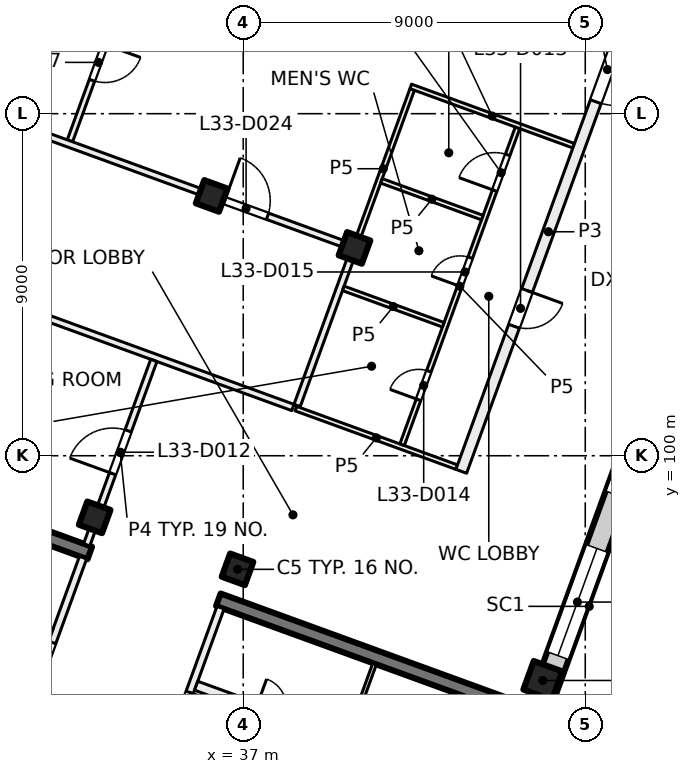
"""IFC4 building model, lengths in metres.
Left out: names, types, materials, properties, quantities, classifications, styles, units other than length and angle.
Written with IfcOpenShell. Run it as: python <this file> out.ifc"""

import sys

from ifc_helpers import new_model, si_unit, direction, frame, frame_2d, origin, origin_2d, place, context, subcontext, project, spatial, rectangle, extrude, element, fill, save


model = new_model("IFC4")
c1 = context("Model", 3, precision=1e-05, world=origin(), true_north=direction((0.0, 1.0)))
c2 = subcontext(c1, "Body", "Model", "MODEL_VIEW")
j1 = project(units=[si_unit("LENGTHUNIT", "METRE"), si_unit("PLANEANGLEUNIT", "RADIAN")], contexts=[c1])
p1 = place(None, origin())
s1 = spatial("IfcSite", under=j1, at=p1, CompositionType="ELEMENT")
p2 = place(p1, origin())
s2 = spatial("IfcBuilding", under=s1, at=p2, CompositionType="ELEMENT")
p3 = place(p2, frame((0.0, 0.0, 142.5)))
s3 = spatial("IfcBuildingStorey", under=s2, at=p3, CompositionType="ELEMENT", Elevation=142.5)
for number, where, z_axis, x_axis in (
    (1, (39.927, 105.468, 0.0), (0.0, 0.0, 1.0), (-0.342, -0.94, 0.0)),
    (2, (36.849, 97.011, 0.0), (0.0, 0.0, 1.0), (-0.342, -0.94, 0.0)),
    (3, (36.169, 106.836, 0.0), (0.0, 0.0, 1.0), (-0.342, -0.94, 0.0)),
    (4, (33.091, 98.379, 0.0), (0.0, 0.0, 1.0), (-0.342, -0.94, 0.0)),
):
    element("IfcColumn", number, at=place(p3, frame(where, z_axis=z_axis, x_axis=x_axis)), inside=s3, PredefinedType="COLUMN", context=c2, shape_type="SweptSolid", body=[
        extrude(rectangle(XDim=0.65, YDim=0.65, at=origin_2d()), origin(), (0.0, 0.0, 1.0), 4.0),
    ])
p4 = place(p3, frame((44.884, 94.087, 0.0), z_axis=(0.0, 0.0, 1.0), x_axis=(-0.342020143326, -0.939692620786, 0.0)))
e5 = element("IfcColumn", 5, at=p4, inside=s3, PredefinedType="COLUMN", context=c2, shape_type="SweptSolid", body=[
    extrude(rectangle(XDim=0.8, YDim=0.8, at=origin_2d()), origin(), (0.0, 0.0, 1.0), 4.0),
])
p5 = place(p3, frame((41.85, 85.241, 0.0), z_axis=(0.0, 0.0, 1.0), x_axis=(0.34201902012, 0.939693029598, 0.0)))
e6 = element("IfcWall", 6, at=p5, inside=s3, PredefinedType="SHEAR", context=c2, shape_type="SweptSolid", body=[
    extrude(rectangle(XDim=8.95, YDim=0.55, at=frame_2d((4.475, 0.0))), origin(), (0.0, 0.0, 1.0), 4.0),
])
p6 = place(p3, frame((44.473, 93.251, 0.0), z_axis=(0.0, 0.0, 1.0), x_axis=(-0.939692847377, 0.34201952077, 0.0)))
e7 = element("IfcWall", 7, at=p6, inside=s3, PredefinedType="SHEAR", context=c2, shape_type="SweptSolid", body=[
    extrude(rectangle(XDim=8.65, YDim=0.35, at=frame_2d((4.325, 0.0))), origin(), (0.0, 0.0, 1.0), 4.0),
])
p7 = place(p3, frame((32.962, 97.441, 0.0), z_axis=(0.0, 0.0, 1.0), x_axis=(-0.939689545667, 0.342028592028, 0.0)))
e8 = element("IfcWall", 8, at=p7, inside=s3, PredefinedType="SHEAR", context=c2, shape_type="SweptSolid", body=[
    extrude(rectangle(XDim=8.65, YDim=0.35, at=frame_2d((4.325, 0.0))), origin(), (0.0, 0.0, 1.0), 4.0),
])
p8 = place(p3, frame((52.212, 113.783, 0.0), z_axis=(0.0, 0.0, 1.0), x_axis=(-0.34202521188, -0.939690775968, 0.0)))
e9 = element("IfcWall", 9, at=p8, inside=s3, PredefinedType="SOLIDWALL", context=c2, shape_type="SweptSolid", body=[
    extrude(rectangle(XDim=21.745, YDim=0.6, at=frame_2d((10.873, 0.0))), origin(), (0.0, 0.0, 1.0), 3.625),
])
p9 = place(p8, frame((3.765, 0.0, 0.9)))
e10 = element("IfcOpeningElement", 10, at=p9, cuts=e9, PredefinedType="OPENING", context=c2, shape_type="SweptSolid", body=[
    extrude(rectangle(XDim=3.0, YDim=2.4, at=frame_2d((1.5, 1.2))), frame((0.0, 0.31, 0.0), z_axis=(0.0, -1.0, 0.0), x_axis=(1.0, 0.0, 0.0)), (0.0, 0.0, 1.0), 0.62),
])
p10 = place(p8, frame((8.865, 0.0, 0.0)))
e11 = element("IfcOpeningElement", 11, at=p10, cuts=e9, PredefinedType="OPENING", context=c2, shape_type="SweptSolid", body=[
    extrude(rectangle(XDim=1.8, YDim=2.4, at=frame_2d((0.9, 1.2))), frame((0.0, 0.31, 0.0), z_axis=(0.0, -1.0, 0.0), x_axis=(1.0, 0.0, 0.0)), (0.0, 0.0, 1.0), 0.62),
])
p11 = place(p8, frame((12.765, 0.0, 0.9)))
e12 = element("IfcOpeningElement", 12, at=p11, cuts=e9, PredefinedType="OPENING", context=c2, shape_type="SweptSolid", body=[
    extrude(rectangle(XDim=3.0, YDim=2.4, at=frame_2d((1.5, 1.2))), frame((0.0, 0.31, 0.0), z_axis=(0.0, -1.0, 0.0), x_axis=(1.0, 0.0, 0.0)), (0.0, 0.0, 1.0), 0.62),
])
p12 = place(p8, frame((17.265, 0.0, 0.9)))
e13 = element("IfcOpeningElement", 13, at=p12, cuts=e9, PredefinedType="OPENING", context=c2, shape_type="SweptSolid", body=[
    extrude(rectangle(XDim=3.0, YDim=2.4, at=frame_2d((1.5, 1.2))), frame((0.0, 0.31, 0.0), z_axis=(0.0, -1.0, 0.0), x_axis=(1.0, 0.0, 0.0)), (0.0, 0.0, 1.0), 0.62),
])
p13 = place(p3, frame((24.666, 100.669, 0.0), z_axis=(0.0, 0.0, 1.0), x_axis=(0.34201964167, 0.939692803373, 0.0)))
e14 = element("IfcWall", 14, at=p13, inside=s3, PredefinedType="SOLIDWALL", context=c2, shape_type="SweptSolid", body=[
    extrude(rectangle(XDim=32.884, YDim=0.6, at=frame_2d((16.442, 0.0))), origin(), (0.0, 0.0, 1.0), 3.625),
])
p14 = place(p13, frame((1.48, 0.0, 0.9)))
e15 = element("IfcOpeningElement", 15, at=p14, cuts=e14, PredefinedType="OPENING", context=c2, shape_type="SweptSolid", body=[
    extrude(rectangle(XDim=3.0, YDim=2.4, at=frame_2d((1.5, 1.2))), frame((0.0, 0.31, 0.0), z_axis=(0.0, -1.0, 0.0), x_axis=(1.0, 0.0, 0.0)), (0.0, 0.0, 1.0), 0.62),
])
p15 = place(p13, frame((5.98, 0.0, 0.9)))
e16 = element("IfcOpeningElement", 16, at=p15, cuts=e14, PredefinedType="OPENING", context=c2, shape_type="SweptSolid", body=[
    extrude(rectangle(XDim=3.0, YDim=2.4, at=frame_2d((1.5, 1.2))), frame((0.0, 0.31, 0.0), z_axis=(0.0, -1.0, 0.0), x_axis=(1.0, 0.0, 0.0)), (0.0, 0.0, 1.0), 0.62),
])
p16 = place(p13, frame((11.08, 0.0, 0.0)))
e17 = element("IfcOpeningElement", 17, at=p16, cuts=e14, PredefinedType="OPENING", context=c2, shape_type="SweptSolid", body=[
    extrude(rectangle(XDim=1.8, YDim=2.4, at=frame_2d((0.9, 1.2))), frame((0.0, 0.31, 0.0), z_axis=(0.0, -1.0, 0.0), x_axis=(1.0, 0.0, 0.0)), (0.0, 0.0, 1.0), 0.62),
])
p17 = place(p13, frame((14.98, 0.0, 0.9)))
e18 = element("IfcOpeningElement", 18, at=p17, cuts=e14, PredefinedType="OPENING", context=c2, shape_type="SweptSolid", body=[
    extrude(rectangle(XDim=3.0, YDim=2.4, at=frame_2d((1.5, 1.2))), frame((0.0, 0.31, 0.0), z_axis=(0.0, -1.0, 0.0), x_axis=(1.0, 0.0, 0.0)), (0.0, 0.0, 1.0), 0.62),
])
p18 = place(p13, frame((19.48, 0.0, 0.9)))
e19 = element("IfcOpeningElement", 19, at=p18, cuts=e14, PredefinedType="OPENING", context=c2, shape_type="SweptSolid", body=[
    extrude(rectangle(XDim=3.0, YDim=2.4, at=frame_2d((1.5, 1.2))), frame((0.0, 0.31, 0.0), z_axis=(0.0, -1.0, 0.0), x_axis=(1.0, 0.0, 0.0)), (0.0, 0.0, 1.0), 0.62),
])
p19 = place(p13, frame((24.58, 0.0, 0.0)))
e20 = element("IfcOpeningElement", 20, at=p19, cuts=e14, PredefinedType="OPENING", context=c2, shape_type="SweptSolid", body=[
    extrude(rectangle(XDim=1.8, YDim=2.4, at=frame_2d((0.9, 1.2))), frame((0.0, 0.31, 0.0), z_axis=(0.0, -1.0, 0.0), x_axis=(1.0, 0.0, 0.0)), (0.0, 0.0, 1.0), 0.62),
])
p20 = place(p13, frame((28.48, 0.0, 0.9)))
e21 = element("IfcOpeningElement", 21, at=p20, cuts=e14, PredefinedType="OPENING", context=c2, shape_type="SweptSolid", body=[
    extrude(rectangle(XDim=3.0, YDim=2.4, at=frame_2d((1.5, 1.2))), frame((0.0, 0.31, 0.0), z_axis=(0.0, -1.0, 0.0), x_axis=(1.0, 0.0, 0.0)), (0.0, 0.0, 1.0), 0.62),
])
p21 = place(p3, frame((31.459, 93.678, 0.0), z_axis=(0.0, 0.0, 1.0), x_axis=(0.341985870128, 0.939705094502, 0.0)))
e22 = element("IfcWall", 22, at=p21, inside=s3, PredefinedType="PARTITIONING", context=c2, shape_type="SweptSolid", body=[
    extrude(rectangle(XDim=3.875, YDim=0.2, at=frame_2d((1.938, 0.0))), origin(), (0.0, 0.0, 1.0), 3.625),
])
p22 = place(p21, frame((0.3, 0.0, 0.0)))
e23 = element("IfcOpeningElement", 23, at=p22, cuts=e22, PredefinedType="OPENING", context=c2, shape_type="SweptSolid", body=[
    extrude(rectangle(XDim=1.2, YDim=2.1, at=frame_2d((0.6, 1.05))), frame((0.0, 0.11, 0.0), z_axis=(0.0, -1.0, 0.0), x_axis=(1.0, 0.0, 0.0)), (0.0, 0.0, 1.0), 0.22),
])
p23 = place(p3, frame((24.039, 98.215, 0.0), z_axis=(0.0, 0.0, 1.0), x_axis=(0.939687617333, -0.342033889887, 0.0)))
e24 = element("IfcWall", 24, at=p23, inside=s3, PredefinedType="PARTITIONING", context=c2, shape_type="SweptSolid", body=[
    extrude(rectangle(XDim=8.425, YDim=0.25, at=frame_2d((4.212, 0.0))), origin(), (0.0, 0.0, 1.0), 3.625),
])
p24 = place(p23, frame((5.242, 0.0, 0.0)))
e25 = element("IfcOpeningElement", 25, at=p24, cuts=e24, PredefinedType="OPENING", context=c2, shape_type="SweptSolid", body=[
    extrude(rectangle(XDim=0.8, YDim=2.1, at=frame_2d((0.4, 1.05))), frame((0.0, 0.135, 0.0), z_axis=(0.0, -1.0, 0.0), x_axis=(1.0, 0.0, 0.0)), (0.0, 0.0, 1.0), 0.27),
])
p25 = place(p23, frame((0.88, 0.0, 0.0)))
e26 = element("IfcOpeningElement", 26, at=p25, cuts=e24, PredefinedType="OPENING", context=c2, shape_type="SweptSolid", body=[
    extrude(rectangle(XDim=1.0, YDim=2.1, at=frame_2d((0.5, 1.05))), frame((0.0, 0.135, 0.0), z_axis=(0.0, -1.0, 0.0), x_axis=(1.0, 0.0, 0.0)), (0.0, 0.0, 1.0), 0.27),
])
p26 = place(p3, frame((36.403, 96.003, 0.0), z_axis=(0.0, 0.0, 1.0), x_axis=(-0.342041503764, -0.939684845947, 0.0)))
e27 = element("IfcWall", 27, at=p26, inside=s3, PredefinedType="PARTITIONING", context=c2, shape_type="SweptSolid", body=[
    extrude(rectangle(XDim=3.875, YDim=0.2, at=frame_2d((1.938, 0.0))), origin(), (0.0, 0.0, 1.0), 3.625),
])
p27 = place(p26, frame((2.375, 0.0, 0.0)))
e28 = element("IfcOpeningElement", 28, at=p27, cuts=e27, PredefinedType="OPENING", context=c2, shape_type="SweptSolid", body=[
    extrude(rectangle(XDim=1.2, YDim=2.1, at=frame_2d((0.6, 1.05))), frame((0.0, 0.11, 0.0), z_axis=(0.0, -1.0, 0.0), x_axis=(1.0, 0.0, 0.0)), (0.0, 0.0, 1.0), 0.22),
])
p28 = place(p3, frame((35.761, 93.948, 0.0), z_axis=(0.0, 0.0, 1.0), x_axis=(0.93969693093, -0.342008301071, 0.0)))
e29 = element("IfcWall", 29, at=p28, inside=s3, PredefinedType="PARTITIONING", context=c2, shape_type="SweptSolid", body=[
    extrude(rectangle(XDim=8.425, YDim=0.25, at=frame_2d((4.212, 0.0))), origin(), (0.0, 0.0, 1.0), 3.625),
])
p29 = place(p28, frame((1.683, 0.0, 0.0)))
e30 = element("IfcOpeningElement", 30, at=p29, cuts=e29, PredefinedType="OPENING", context=c2, shape_type="SweptSolid", body=[
    extrude(rectangle(XDim=0.8, YDim=2.1, at=frame_2d((0.4, 1.05))), frame((0.0, 0.135, 0.0), z_axis=(0.0, -1.0, 0.0), x_axis=(1.0, 0.0, 0.0)), (0.0, 0.0, 1.0), 0.27),
])
p30 = place(p28, frame((5.945, 0.0, 0.0)))
e31 = element("IfcOpeningElement", 31, at=p30, cuts=e29, PredefinedType="OPENING", context=c2, shape_type="SweptSolid", body=[
    extrude(rectangle(XDim=0.8, YDim=2.1, at=frame_2d((0.4, 1.05))), frame((0.0, 0.135, 0.0), z_axis=(0.0, -1.0, 0.0), x_axis=(1.0, 0.0, 0.0)), (0.0, 0.0, 1.0), 0.27),
])
p31 = place(p3, frame((40.457, 94.527, 0.0), z_axis=(0.0, 0.0, 1.0), x_axis=(-0.342043138314, -0.939684250976, 0.0)))
e32 = element("IfcWall", 32, at=p31, inside=s3, PredefinedType="PARTITIONING", context=c2, shape_type="SweptSolid", body=[
    extrude(rectangle(XDim=2.025, YDim=0.1, at=frame_2d((1.012, 0.0))), origin(), (0.0, 0.0, 1.0), 3.625),
])
p32 = place(p3, frame((26.736, 105.48, 0.0), z_axis=(0.0, 0.0, 1.0), x_axis=(0.939721611154, -0.341940482438, 0.0)))
e33 = element("IfcWall", 33, at=p32, inside=s3, PredefinedType="PARTITIONING", context=c2, shape_type="SweptSolid", body=[
    extrude(rectangle(XDim=12.312, YDim=0.175, at=frame_2d((6.156, 0.0))), origin(), (0.0, 0.0, 1.0), 3.625),
])
p33 = place(p3, frame((37.053, 120.96, 0.0), z_axis=(0.0, 0.0, 1.0), x_axis=(-0.342023551531, -0.939691380293, 0.0)))
e34 = element("IfcWall", 34, at=p33, inside=s3, PredefinedType="PARTITIONING", context=c2, shape_type="SweptSolid", body=[
    extrude(rectangle(XDim=13.488, YDim=0.15, at=frame_2d((6.744, 0.0))), origin(), (0.0, 0.0, 1.0), 3.625),
])
p34 = place(p33, frame((10.791, 0.0, 0.0)))
e35 = element("IfcOpeningElement", 35, at=p34, cuts=e34, PredefinedType="OPENING", context=c2, shape_type="SweptSolid", body=[
    extrude(rectangle(XDim=1.0, YDim=2.1, at=frame_2d((0.5, 1.05))), frame((0.0, 0.085, 0.0), z_axis=(0.0, -1.0, 0.0), x_axis=(1.0, 0.0, 0.0)), (0.0, 0.0, 1.0), 0.17),
])
p35 = place(p33, frame((6.324, 0.0, 0.0)))
e36 = element("IfcOpeningElement", 36, at=p35, cuts=e34, PredefinedType="OPENING", context=c2, shape_type="SweptSolid", body=[
    extrude(rectangle(XDim=1.0, YDim=2.1, at=frame_2d((0.5, 1.05))), frame((0.0, 0.085, 0.0), z_axis=(0.0, -1.0, 0.0), x_axis=(1.0, 0.0, 0.0)), (0.0, 0.0, 1.0), 0.17),
])
p36 = place(p33, frame((1.824, 0.0, 0.0)))
e37 = element("IfcOpeningElement", 37, at=p36, cuts=e34, PredefinedType="OPENING", context=c2, shape_type="SweptSolid", body=[
    extrude(rectangle(XDim=1.0, YDim=2.1, at=frame_2d((0.5, 1.05))), frame((0.0, 0.085, 0.0), z_axis=(0.0, -1.0, 0.0), x_axis=(1.0, 0.0, 0.0)), (0.0, 0.0, 1.0), 0.17),
])
p37 = place(p3, frame((32.881, 97.657, 0.0), z_axis=(0.0, 0.0, 1.0), x_axis=(0.342058204353, 0.939678766832, 0.0)))
e38 = element("IfcWall", 38, at=p37, inside=s3, PredefinedType="PARTITIONING", context=c2, shape_type="SweptSolid", body=[
    extrude(rectangle(XDim=5.163, YDim=0.175, at=frame_2d((2.581, 0.0))), origin(), (0.0, 0.0, 1.0), 3.625),
])
p38 = place(p37, frame((1.991, 0.0, 0.0)))
e39 = element("IfcOpeningElement", 39, at=p38, cuts=e38, PredefinedType="OPENING", context=c2, shape_type="SweptSolid", body=[
    extrude(rectangle(XDim=1.2, YDim=2.1, at=frame_2d((0.6, 1.05))), frame((0.0, 0.097, 0.0), z_axis=(0.0, -1.0, 0.0), x_axis=(1.0, 0.0, 0.0)), (0.0, 0.0, 1.0), 0.195),
])
p39 = place(p3, frame((38.385, 101.24, 0.0), z_axis=(0.0, 0.0, 1.0), x_axis=(0.939711088937, -0.341969398235, 0.0)))
e40 = element("IfcWall", 40, at=p39, inside=s3, PredefinedType="PARTITIONING", context=c2, shape_type="SweptSolid", body=[
    extrude(rectangle(XDim=4.503, YDim=0.125, at=frame_2d((2.252, 0.0))), origin(), (0.0, 0.0, 1.0), 3.625),
])
p40 = place(p3, frame((38.418, 101.322, 0.0), z_axis=(0.0, 0.0, 1.0), x_axis=(0.341987815327, 0.939704386585, 0.0)))
e41 = element("IfcWall", 41, at=p40, inside=s3, PredefinedType="PARTITIONING", context=c2, shape_type="SweptSolid", body=[
    extrude(rectangle(XDim=4.325, YDim=0.175, at=frame_2d((2.162, 0.0))), origin(), (0.0, 0.0, 1.0), 3.625),
])
p41 = place(p3, frame((39.926, 105.465, 0.0), z_axis=(0.0, 0.0, 1.0), x_axis=(0.342263852659, 0.93960388205, 0.0)))
e42 = element("IfcWall", 42, at=p41, inside=s3, PredefinedType="PARTITIONING", context=c2, shape_type="SweptSolid", body=[
    extrude(rectangle(XDim=4.441, YDim=0.125, at=frame_2d((2.221, 0.0))), origin(), (0.0, 0.0, 1.0), 3.625),
])
p42 = place(p3, frame((28.275, 109.709, 0.0), z_axis=(0.0, 0.0, 1.0), x_axis=(0.939698441386, -0.342004150936, 0.0)))
e43 = element("IfcWall", 43, at=p42, inside=s3, PredefinedType="PARTITIONING", context=c2, shape_type="SweptSolid", body=[
    extrude(rectangle(XDim=12.312, YDim=0.175, at=frame_2d((6.156, 0.0))), origin(), (0.0, 0.0, 1.0), 3.625),
])
p43 = place(p42, frame((8.765, 0.0, 0.0)))
e44 = element("IfcOpeningElement", 44, at=p43, cuts=e43, PredefinedType="OPENING", context=c2, shape_type="SweptSolid", body=[
    extrude(rectangle(XDim=1.2, YDim=2.1, at=frame_2d((0.6, 1.05))), frame((0.0, 0.097, 0.0), z_axis=(0.0, -1.0, 0.0), x_axis=(1.0, 0.0, 0.0)), (0.0, 0.0, 1.0), 0.195),
])
p44 = place(p3, frame((41.181, 100.29, 0.0), z_axis=(0.0, 0.0, 1.0), x_axis=(0.34222012082, 0.939619810831, 0.0)))
e45 = element("IfcWall", 45, at=p44, inside=s3, PredefinedType="PARTITIONING", context=c2, shape_type="SweptSolid", body=[
    extrude(rectangle(XDim=8.875, YDim=0.125, at=frame_2d((4.438, 0.0))), origin(), (0.0, 0.0, 1.0), 3.625),
])
p45 = place(p44, frame((1.258, 0.0, 0.0)))
e46 = element("IfcOpeningElement", 46, at=p45, cuts=e45, PredefinedType="OPENING", context=c2, shape_type="SweptSolid", body=[
    extrude(rectangle(XDim=0.8, YDim=2.1, at=frame_2d((0.4, 1.05))), frame((0.0, 0.073, 0.0), z_axis=(0.0, -1.0, 0.0), x_axis=(1.0, 0.0, 0.0)), (0.0, 0.0, 1.0), 0.145),
])
p46 = place(p44, frame((4.437, 0.0, 0.0)))
e47 = element("IfcOpeningElement", 47, at=p46, cuts=e45, PredefinedType="OPENING", context=c2, shape_type="SweptSolid", body=[
    extrude(rectangle(XDim=0.8, YDim=2.1, at=frame_2d((0.4, 1.05))), frame((0.0, 0.073, 0.0), z_axis=(0.0, -1.0, 0.0), x_axis=(1.0, 0.0, 0.0)), (0.0, 0.0, 1.0), 0.145),
])
p47 = place(p44, frame((7.116, 0.0, 0.0)))
e48 = element("IfcOpeningElement", 48, at=p47, cuts=e45, PredefinedType="OPENING", context=c2, shape_type="SweptSolid", body=[
    extrude(rectangle(XDim=1.0, YDim=2.1, at=frame_2d((0.5, 1.05))), frame((0.0, 0.073, 0.0), z_axis=(0.0, -1.0, 0.0), x_axis=(1.0, 0.0, 0.0)), (0.0, 0.0, 1.0), 0.145),
])
p48 = place(p3, frame((41.408, 109.718, 0.0), z_axis=(0.0, 0.0, 1.0), x_axis=(0.939646475447, -0.3421469, 0.0)))
e49 = element("IfcWall", 49, at=p48, inside=s3, PredefinedType="PARTITIONING", context=c2, shape_type="SweptSolid", body=[
    extrude(rectangle(XDim=4.562, YDim=0.125, at=frame_2d((2.281, 0.0))), origin(), (0.0, 0.0, 1.0), 3.625),
])
p49 = place(p3, frame((42.264, 103.446, 0.0), z_axis=(0.0, 0.0, 1.0), x_axis=(-0.939640574808, 0.342163104635, 0.0)))
e50 = element("IfcWall", 50, at=p49, inside=s3, PredefinedType="PARTITIONING", context=c2, shape_type="SweptSolid", body=[
    extrude(rectangle(XDim=2.8, YDim=0.125, at=frame_2d((1.4, 0.0))), origin(), (0.0, 0.0, 1.0), 3.625),
])
p50 = place(p3, frame((47.325, 112.197, 0.0), z_axis=(0.0, 0.0, 1.0), x_axis=(-0.341976837053, -0.93970838185, 0.0)))
e51 = element("IfcWall", 51, at=p50, inside=s3, PredefinedType="PARTITIONING", context=c2, shape_type="SweptSolid", body=[
    extrude(rectangle(XDim=13.416, YDim=0.3, at=frame_2d((6.708, 0.0))), origin(), (0.0, 0.0, 1.0), 3.625),
])
p51 = place(p50, frame((8.354, 0.0, 0.0)))
e52 = element("IfcOpeningElement", 52, at=p51, cuts=e51, PredefinedType="OPENING", context=c2, shape_type="SweptSolid", body=[
    extrude(rectangle(XDim=1.0, YDim=2.1, at=frame_2d((0.5, 1.05))), frame((0.0, 0.16, 0.0), z_axis=(0.0, -1.0, 0.0), x_axis=(1.0, 0.0, 0.0)), (0.0, 0.0, 1.0), 0.32),
])
p52 = place(p50, frame((1.267, 0.0, 0.0)))
e53 = element("IfcOpeningElement", 53, at=p52, cuts=e51, PredefinedType="OPENING", context=c2, shape_type="SweptSolid", body=[
    extrude(rectangle(XDim=1.8, YDim=2.1, at=frame_2d((0.9, 1.05))), frame((0.0, 0.16, 0.0), z_axis=(0.0, -1.0, 0.0), x_axis=(1.0, 0.0, 0.0)), (0.0, 0.0, 1.0), 0.32),
])
p53 = place(p3, frame((43.29, 106.266, 0.0), z_axis=(0.0, 0.0, 1.0), x_axis=(-0.939601484935, 0.342270433294, 0.0)))
e54 = element("IfcWall", 54, at=p53, inside=s3, PredefinedType="PARTITIONING", context=c2, shape_type="SweptSolid", body=[
    extrude(rectangle(XDim=2.825, YDim=0.125, at=frame_2d((1.412, 0.0))), origin(), (0.0, 0.0, 1.0), 3.625),
])
p54 = place(p12, origin())
e55 = element("IfcWindow", 55, at=p54, inside=s3, PartitioningType="SINGLE_PANEL", PredefinedType="WINDOW", context=c2, shape_type="SweptSolid", body=[
    extrude(rectangle(XDim=3.0, YDim=2.4, at=frame_2d((1.5, 1.2))), frame((0.0, 0.03, 0.0), z_axis=(0.0, -1.0, 0.0), x_axis=(1.0, 0.0, 0.0)), (0.0, 0.0, 1.0), 0.06),
])
fill(e13, e55)
p55 = place(p22, origin())
e56 = element("IfcDoor", 56, at=p55, inside=s3, OperationType="DOUBLE_DOOR_SINGLE_SWING", PredefinedType="DOOR", context=c2, shape_type="SweptSolid", body=[
    extrude(rectangle(XDim=1.2, YDim=2.1, at=frame_2d((0.6, 1.05))), frame((0.0, 0.025, 0.0), z_axis=(0.0, -1.0, 0.0), x_axis=(1.0, 0.0, 0.0)), (0.0, 0.0, 1.0), 0.05),
])
fill(e23, e56)
p56 = place(p27, origin())
e57 = element("IfcDoor", 57, at=p56, inside=s3, OperationType="DOUBLE_DOOR_SINGLE_SWING", PredefinedType="DOOR", context=c2, shape_type="SweptSolid", body=[
    extrude(rectangle(XDim=1.2, YDim=2.1, at=frame_2d((0.6, 1.05))), frame((0.0, 0.025, 0.0), z_axis=(0.0, -1.0, 0.0), x_axis=(1.0, 0.0, 0.0)), (0.0, 0.0, 1.0), 0.05),
])
fill(e28, e57)
p57 = place(p38, origin())
e58 = element("IfcDoor", 58, at=p57, inside=s3, OperationType="DOUBLE_DOOR_SINGLE_SWING", PredefinedType="DOOR", context=c2, shape_type="SweptSolid", body=[
    extrude(rectangle(XDim=1.2, YDim=2.1, at=frame_2d((0.6, 1.05))), frame((0.0, 0.025, 0.0), z_axis=(0.0, -1.0, 0.0), x_axis=(1.0, 0.0, 0.0)), (0.0, 0.0, 1.0), 0.05),
])
fill(e39, e58)
p58 = place(p51, origin())
e59 = element("IfcDoor", 59, at=p58, inside=s3, OperationType="SINGLE_SWING_LEFT", PredefinedType="DOOR", context=c2, shape_type="SweptSolid", body=[
    extrude(rectangle(XDim=1.0, YDim=2.1, at=frame_2d((0.5, 1.05))), frame((0.0, 0.025, 0.0), z_axis=(0.0, -1.0, 0.0), x_axis=(1.0, 0.0, 0.0)), (0.0, 0.0, 1.0), 0.05),
])
fill(e52, e59)
p59 = place(p45, origin())
e60 = element("IfcDoor", 60, at=p59, inside=s3, OperationType="SINGLE_SWING_LEFT", PredefinedType="DOOR", context=c2, shape_type="SweptSolid", body=[
    extrude(rectangle(XDim=0.8, YDim=2.1, at=frame_2d((0.4, 1.05))), frame((0.0, 0.025, 0.0), z_axis=(0.0, -1.0, 0.0), x_axis=(1.0, 0.0, 0.0)), (0.0, 0.0, 1.0), 0.05),
])
fill(e46, e60)
p60 = place(p46, origin())
e61 = element("IfcDoor", 61, at=p60, inside=s3, OperationType="SINGLE_SWING_LEFT", PredefinedType="DOOR", context=c2, shape_type="SweptSolid", body=[
    extrude(rectangle(XDim=0.8, YDim=2.1, at=frame_2d((0.4, 1.05))), frame((0.0, 0.025, 0.0), z_axis=(0.0, -1.0, 0.0), x_axis=(1.0, 0.0, 0.0)), (0.0, 0.0, 1.0), 0.05),
])
fill(e47, e61)
p61 = place(p47, origin())
e62 = element("IfcDoor", 62, at=p61, inside=s3, OperationType="SINGLE_SWING_LEFT", PredefinedType="DOOR", context=c2, shape_type="SweptSolid", body=[
    extrude(rectangle(XDim=1.0, YDim=2.1, at=frame_2d((0.5, 1.05))), frame((0.0, 0.025, 0.0), z_axis=(0.0, -1.0, 0.0), x_axis=(1.0, 0.0, 0.0)), (0.0, 0.0, 1.0), 0.05),
])
fill(e48, e62)
p62 = place(p34, origin())
e63 = element("IfcDoor", 63, at=p62, inside=s3, OperationType="SINGLE_SWING_LEFT", PredefinedType="DOOR", context=c2, shape_type="SweptSolid", body=[
    extrude(rectangle(XDim=1.0, YDim=2.1, at=frame_2d((0.5, 1.05))), frame((0.0, 0.025, 0.0), z_axis=(0.0, -1.0, 0.0), x_axis=(1.0, 0.0, 0.0)), (0.0, 0.0, 1.0), 0.05),
])
fill(e35, e63)
p63 = place(p52, origin())
e64 = element("IfcDoor", 64, at=p63, inside=s3, OperationType="DOUBLE_DOOR_SINGLE_SWING", PredefinedType="DOOR", context=c2, shape_type="SweptSolid", body=[
    extrude(rectangle(XDim=1.8, YDim=2.1, at=frame_2d((0.9, 1.05))), frame((0.0, 0.025, 0.0), z_axis=(0.0, -1.0, 0.0), x_axis=(1.0, 0.0, 0.0)), (0.0, 0.0, 1.0), 0.05),
])
fill(e53, e64)
p64 = place(p43, origin())
e65 = element("IfcDoor", 65, at=p64, inside=s3, OperationType="DOUBLE_DOOR_SINGLE_SWING", PredefinedType="DOOR", context=c2, shape_type="SweptSolid", body=[
    extrude(rectangle(XDim=1.2, YDim=2.1, at=frame_2d((0.6, 1.05))), frame((0.0, 0.025, 0.0), z_axis=(0.0, -1.0, 0.0), x_axis=(1.0, 0.0, 0.0)), (0.0, 0.0, 1.0), 0.05),
])
fill(e44, e65)
save(model, sys.argv[1])
